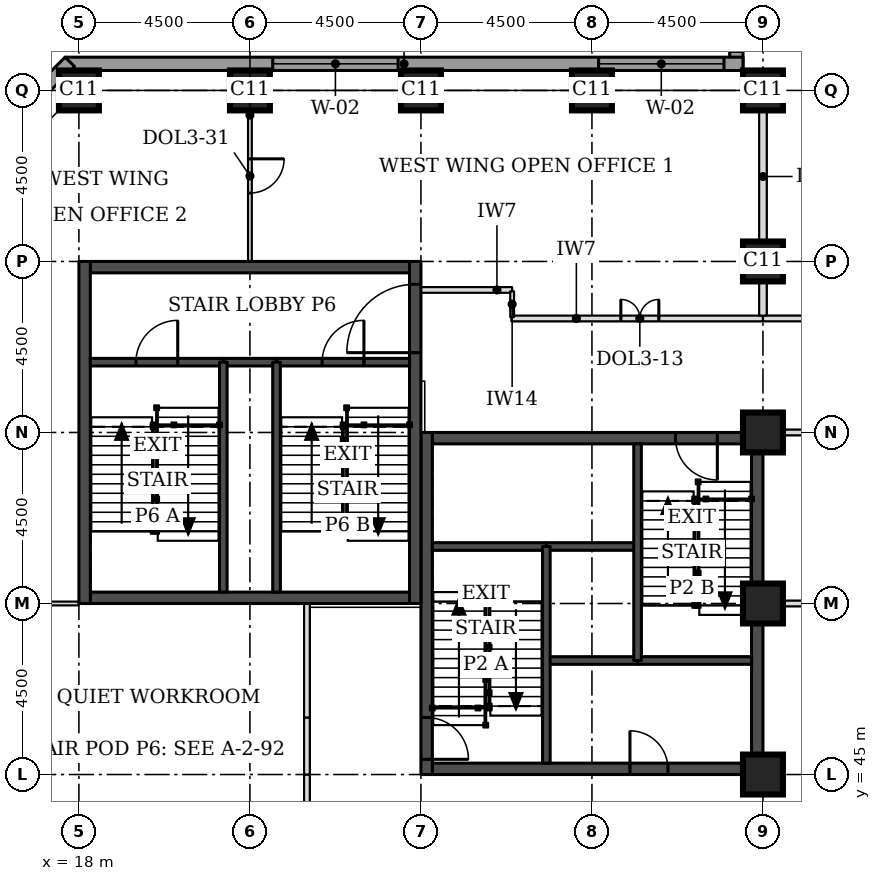
"""IFC4 building model, lengths in metres.
Left out: names, types, materials, properties, quantities, classifications, styles, units other than length and angle.
Written with IfcOpenShell. Run it as: python <this file> out.ifc"""

import sys

from ifc_helpers import new_model, si_unit, direction, frame, frame_2d, origin, origin_2d, place, context, subcontext, project, spatial, rectangle, extrude, element, fill, save


model = new_model("IFC4")
c1 = context("Model", 3, precision=1e-05, world=origin(), true_north=direction((0.0, 1.0)))
c2 = subcontext(c1, "Body", "Model", "MODEL_VIEW")
j1 = project(units=[si_unit("LENGTHUNIT", "METRE"), si_unit("PLANEANGLEUNIT", "RADIAN")], contexts=[c1])
p1 = place(None, origin())
s1 = spatial("IfcSite", under=j1, at=p1, CompositionType="ELEMENT")
p2 = place(p1, origin())
s2 = spatial("IfcBuilding", under=s1, at=p2, CompositionType="ELEMENT")
p3 = place(p2, frame((0.0, 0.0, 97.4)))
s3 = spatial("IfcBuildingStorey", under=s2, at=p3, CompositionType="ELEMENT", Elevation=97.4)
for number, where, z_axis, x_axis in (
    (1, (36.0, 45.0, 0.0), (0.0, 0.0, 1.0), (1.0, 0.0, 0.0)),
    (2, (36.0, 49.5, 0.0), (0.0, 0.0, 1.0), (1.0, 0.0, 0.0)),
    (3, (36.0, 54.0, 0.0), (0.0, 0.0, 1.0), (1.0, 0.0, 0.0)),
    (4, (36.0, 58.5, 0.0), (0.0, 0.0, 1.0), (1.0, 0.0, 0.0)),
    (5, (18.0, 63.0, 0.0), (0.0, 0.0, 1.0), (1.0, 0.0, 0.0)),
    (6, (22.5, 63.0, 0.0), (0.0, 0.0, 1.0), (1.0, 0.0, 0.0)),
    (7, (27.0, 63.0, 0.0), (0.0, 0.0, 1.0), (1.0, 0.0, 0.0)),
    (8, (31.5, 63.0, 0.0), (0.0, 0.0, 1.0), (1.0, 0.0, 0.0)),
    (9, (36.0, 63.0, 0.0), (0.0, 0.0, 1.0), (1.0, 0.0, 0.0)),
):
    element("IfcColumn", number, at=place(p3, frame(where, z_axis=z_axis, x_axis=x_axis)), inside=s3, PredefinedType="COLUMN", context=c2, shape_type="SweptSolid", body=[
        extrude(rectangle(XDim=1.05, YDim=1.05, at=origin_2d()), origin(), (0.0, 0.0, 1.0), 3.7),
    ])
p4 = place(p3, frame((27.3, 45.15, 0.0), z_axis=(0.0, 0.0, 1.0), x_axis=(1.0, 0.0, 0.0)))
e10 = element("IfcWall", 10, at=p4, inside=s3, PredefinedType="SHEAR", context=c2, shape_type="SweptSolid", body=[
    extrude(rectangle(XDim=8.4, YDim=0.3, at=frame_2d((4.2, 0.0))), origin(), (0.0, 0.0, 1.0), 3.7),
])
p5 = place(p4, frame((5.2, 0.0, 0.0)))
e11 = element("IfcOpeningElement", 11, at=p5, cuts=e10, PredefinedType="OPENING", context=c2, shape_type="SweptSolid", body=[
    extrude(rectangle(XDim=1.0, YDim=2.1, at=frame_2d((0.5, 1.05))), frame((0.0, 0.16, 0.0), z_axis=(0.0, -1.0, 0.0), x_axis=(1.0, 0.0, 0.0)), (0.0, 0.0, 1.0), 0.32),
])
p6 = place(p3, frame((27.3, 53.85, 0.0), z_axis=(0.0, 0.0, 1.0), x_axis=(1.0, 0.0, 0.0)))
e12 = element("IfcWall", 12, at=p6, inside=s3, PredefinedType="SHEAR", context=c2, shape_type="SweptSolid", body=[
    extrude(rectangle(XDim=8.4, YDim=0.3, at=frame_2d((4.2, 0.0))), origin(), (0.0, 0.0, 1.0), 3.7),
])
p7 = place(p6, frame((6.4, 0.0, 0.0)))
e13 = element("IfcOpeningElement", 13, at=p7, cuts=e12, PredefinedType="OPENING", context=c2, shape_type="SweptSolid", body=[
    extrude(rectangle(XDim=1.1, YDim=2.1, at=frame_2d((0.55, 1.05))), frame((0.0, 0.16, 0.0), z_axis=(0.0, -1.0, 0.0), x_axis=(1.0, 0.0, 0.0)), (0.0, 0.0, 1.0), 0.32),
])
p8 = place(p3, frame((27.15, 45.0, 0.0), z_axis=(0.0, 0.0, 1.0), x_axis=(0.0, 1.0, 0.0)))
e14 = element("IfcWall", 14, at=p8, inside=s3, PredefinedType="SHEAR", context=c2, shape_type="SweptSolid", body=[
    extrude(rectangle(XDim=9.0, YDim=0.3, at=frame_2d((4.5, 0.0))), origin(), (0.0, 0.0, 1.0), 3.7),
])
p9 = place(p8, frame((0.4, 0.0, 0.0)))
e15 = element("IfcOpeningElement", 15, at=p9, cuts=e14, PredefinedType="OPENING", context=c2, shape_type="SweptSolid", body=[
    extrude(rectangle(XDim=1.1, YDim=2.1, at=frame_2d((0.55, 1.05))), frame((0.0, 0.16, 0.0), z_axis=(0.0, -1.0, 0.0), x_axis=(1.0, 0.0, 0.0)), (0.0, 0.0, 1.0), 0.32),
])
p10 = place(p3, frame((35.85, 45.0, 0.0), z_axis=(0.0, 0.0, 1.0), x_axis=(0.0, 1.0, 0.0)))
e16 = element("IfcWall", 16, at=p10, inside=s3, PredefinedType="SHEAR", context=c2, shape_type="SweptSolid", body=[
    extrude(rectangle(XDim=9.0, YDim=0.3, at=frame_2d((4.5, 0.0))), origin(), (0.0, 0.0, 1.0), 3.7),
])
for number, where, z_axis, x_axis in (
    (17, (18.3, 49.65, 0.0), (0.0, 0.0, 1.0), (1.0, 0.0, 0.0)),
    (18, (18.3, 58.35, 0.0), (0.0, 0.0, 1.0), (1.0, 0.0, 0.0)),
):
    element("IfcWall", number, at=place(p3, frame(where, z_axis=z_axis, x_axis=x_axis)), inside=s3, PredefinedType="SHEAR", context=c2, shape_type="SweptSolid", body=[
        extrude(rectangle(XDim=8.4, YDim=0.3, at=frame_2d((4.2, 0.0))), origin(), (0.0, 0.0, 1.0), 3.7),
    ])
p11 = place(p3, frame((18.15, 49.5, 0.0), z_axis=(0.0, 0.0, 1.0), x_axis=(0.0, 1.0, 0.0)))
e19 = element("IfcWall", 19, at=p11, inside=s3, PredefinedType="SHEAR", context=c2, shape_type="SweptSolid", body=[
    extrude(rectangle(XDim=9.0, YDim=0.3, at=frame_2d((4.5, 0.0))), origin(), (0.0, 0.0, 1.0), 3.7),
])
p12 = place(p3, frame((26.85, 49.5, 0.0), z_axis=(0.0, 0.0, 1.0), x_axis=(0.0, 1.0, 0.0)))
e20 = element("IfcWall", 20, at=p12, inside=s3, PredefinedType="SHEAR", context=c2, shape_type="SweptSolid", body=[
    extrude(rectangle(XDim=9.0, YDim=0.3, at=frame_2d((4.5, 0.0))), origin(), (0.0, 0.0, 1.0), 3.7),
])
p13 = place(p12, frame((6.6, 0.0, 0.0)))
e21 = element("IfcOpeningElement", 21, at=p13, cuts=e20, PredefinedType="OPENING", context=c2, shape_type="SweptSolid", body=[
    extrude(rectangle(XDim=1.8, YDim=2.1, at=frame_2d((0.9, 1.05))), frame((0.0, 0.16, 0.0), z_axis=(0.0, -1.0, 0.0), x_axis=(1.0, 0.0, 0.0)), (0.0, 0.0, 1.0), 0.32),
])
p14 = place(p3, frame((35.3, 76.862, 0.0), z_axis=(0.0, 0.0, 1.0), x_axis=(0.0, -1.0, 0.0)))
e22 = element("IfcWall", 22, at=p14, inside=s3, PredefinedType="STANDARD", context=c2, shape_type="SweptSolid", body=[
    extrude(rectangle(XDim=13.337, YDim=0.35, at=frame_2d((6.669, 0.0))), origin(), (0.0, 0.0, 1.0), 3.525),
])
p15 = place(p14, frame((9.537, 0.0, 0.9)))
e23 = element("IfcOpeningElement", 23, at=p15, cuts=e22, PredefinedType="OPENING", context=c2, shape_type="SweptSolid", body=[
    extrude(rectangle(XDim=3.3, YDim=1.9, at=frame_2d((1.65, 0.95))), frame((0.0, 0.185, 0.0), z_axis=(0.0, -1.0, 0.0), x_axis=(1.0, 0.0, 0.0)), (0.0, 0.0, 1.0), 0.37),
])
p16 = place(p3, frame((35.475, 63.7, 0.0), z_axis=(0.0, 0.0, 1.0), x_axis=(-1.0, 0.0, 0.0)))
e24 = element("IfcWall", 24, at=p16, inside=s3, PredefinedType="STANDARD", context=c2, shape_type="SweptSolid", body=[
    extrude(rectangle(XDim=17.837, YDim=0.35, at=frame_2d((8.919, 0.0))), origin(), (0.0, 0.0, 1.0), 3.525),
])
p17 = place(p16, frame((0.5, 0.0, 0.9)))
e25 = element("IfcOpeningElement", 25, at=p17, cuts=e24, PredefinedType="OPENING", context=c2, shape_type="SweptSolid", body=[
    extrude(rectangle(XDim=3.3, YDim=1.9, at=frame_2d((1.65, 0.95))), frame((0.0, 0.185, 0.0), z_axis=(0.0, -1.0, 0.0), x_axis=(1.0, 0.0, 0.0)), (0.0, 0.0, 1.0), 0.37),
])
p18 = place(p16, frame((9.075, 0.0, 0.9)))
e26 = element("IfcOpeningElement", 26, at=p18, cuts=e24, PredefinedType="OPENING", context=c2, shape_type="SweptSolid", body=[
    extrude(rectangle(XDim=3.3, YDim=1.9, at=frame_2d((1.65, 0.95))), frame((0.0, 0.185, 0.0), z_axis=(0.0, -1.0, 0.0), x_axis=(1.0, 0.0, 0.0)), (0.0, 0.0, 1.0), 0.37),
])
p19 = place(p3, frame((17.761, 63.751, 0.0), z_axis=(0.0, 0.0, 1.0), x_axis=(-0.707106781187, -0.707106781187, 0.0)))
e27 = element("IfcWall", 27, at=p19, inside=s3, PredefinedType="STANDARD", context=c2, shape_type="SweptSolid", body=[
    extrude(rectangle(XDim=7.089, YDim=0.35, at=frame_2d((3.544, 0.0))), origin(), (0.0, 0.0, 1.0), 3.525),
])
p20 = place(p19, frame((1.894, 0.0, 0.9)))
e28 = element("IfcOpeningElement", 28, at=p20, cuts=e27, PredefinedType="OPENING", context=c2, shape_type="SweptSolid", body=[
    extrude(rectangle(XDim=3.3, YDim=1.9, at=frame_2d((1.65, 0.95))), frame((0.0, 0.185, 0.0), z_axis=(0.0, -1.0, 0.0), x_axis=(1.0, 0.0, 0.0)), (0.0, 0.0, 1.0), 0.37),
])
p21 = place(p3, frame((12.749, 44.761, 0.0), z_axis=(0.0, 0.0, 1.0), x_axis=(0.707106781187, -0.707106781187, 0.0)))
e29 = element("IfcWall", 29, at=p21, inside=s3, PredefinedType="STANDARD", context=c2, shape_type="SweptSolid", body=[
    extrude(rectangle(XDim=7.089, YDim=0.35, at=frame_2d((3.544, 0.0))), origin(), (0.0, 0.0, 1.0), 3.525),
])
p22 = place(p21, frame((1.894, 0.0, 0.9)))
e30 = element("IfcOpeningElement", 30, at=p22, cuts=e29, PredefinedType="OPENING", context=c2, shape_type="SweptSolid", body=[
    extrude(rectangle(XDim=3.3, YDim=1.9, at=frame_2d((1.65, 0.95))), frame((0.0, 0.185, 0.0), z_axis=(0.0, -1.0, 0.0), x_axis=(1.0, 0.0, 0.0)), (0.0, 0.0, 1.0), 0.37),
])
for number, where, z_axis, x_axis in (
    (31, (36.525, 49.5, 0.0), (0.0, 0.0, 1.0), (1.0, 0.0, 0.0)),
    (32, (36.525, 54.0, 0.0), (0.0, 0.0, 1.0), (1.0, 0.0, 0.0)),
):
    element("IfcWall", number, at=place(p3, frame(where, z_axis=z_axis, x_axis=x_axis)), inside=s3, PredefinedType="PARTITIONING", context=c2, shape_type="SweptSolid", body=[
        extrude(rectangle(XDim=5.55, YDim=0.15, at=frame_2d((2.775, 0.0))), origin(), (0.0, 0.0, 1.0), 3.55),
    ])
p23 = place(p3, frame((29.38, 57.0, 0.0), z_axis=(0.0, 0.0, 1.0), x_axis=(1.0, 0.0, 0.0)))
e33 = element("IfcWall", 33, at=p23, inside=s3, PredefinedType="PARTITIONING", context=c2, shape_type="SweptSolid", body=[
    extrude(rectangle(XDim=6.62, YDim=0.15, at=frame_2d((3.31, 0.0))), origin(), (0.0, 0.0, 1.0), 3.55),
])
p24 = place(p23, frame((2.88, 0.0, 0.0)))
e34 = element("IfcOpeningElement", 34, at=p24, cuts=e33, PredefinedType="OPENING", context=c2, shape_type="SweptSolid", body=[
    extrude(rectangle(XDim=1.0, YDim=2.1, at=frame_2d((0.5, 1.05))), frame((0.0, 0.085, 0.0), z_axis=(0.0, -1.0, 0.0), x_axis=(1.0, 0.0, 0.0)), (0.0, 0.0, 1.0), 0.17),
])
p25 = place(p3, frame((36.0, 57.0, 0.0), z_axis=(0.0, 0.0, 1.0), x_axis=(1.0, 0.0, 0.0)))
e35 = element("IfcWall", 35, at=p25, inside=s3, PredefinedType="PARTITIONING", context=c2, shape_type="SweptSolid", body=[
    extrude(rectangle(XDim=6.075, YDim=0.15, at=frame_2d((3.038, 0.0))), origin(), (0.0, 0.0, 1.0), 3.55),
])
p26 = place(p25, frame((2.55, 0.0, 0.0)))
e36 = element("IfcOpeningElement", 36, at=p26, cuts=e35, PredefinedType="OPENING", context=c2, shape_type="SweptSolid", body=[
    extrude(rectangle(XDim=1.0, YDim=2.1, at=frame_2d((0.5, 1.05))), frame((0.0, 0.085, 0.0), z_axis=(0.0, -1.0, 0.0), x_axis=(1.0, 0.0, 0.0)), (0.0, 0.0, 1.0), 0.17),
])
for number, where, z_axis, x_axis in (
    (37, (24.0, 43.5, 0.0), (0.0, 0.0, 1.0), (0.0, 1.0, 0.0)),
    (38, (24.0, 45.0, 0.0), (0.0, 0.0, 1.0), (0.0, 1.0, 0.0)),
):
    element("IfcWall", number, at=place(p3, frame(where, z_axis=z_axis, x_axis=x_axis)), inside=s3, PredefinedType="PARTITIONING", context=c2, shape_type="SweptSolid", body=[
        extrude(rectangle(XDim=1.5, YDim=0.15, at=frame_2d((0.75, 0.0))), origin(), (0.0, 0.0, 1.0), 3.55),
    ])
p27 = place(p3, frame((24.0, 46.5, 0.0), z_axis=(0.0, 0.0, 1.0), x_axis=(0.0, 1.0, 0.0)))
e39 = element("IfcWall", 39, at=p27, inside=s3, PredefinedType="PARTITIONING", context=c2, shape_type="SweptSolid", body=[
    extrude(rectangle(XDim=3.0, YDim=0.15, at=frame_2d((1.5, 0.0))), origin(), (0.0, 0.0, 1.0), 3.55),
])
p28 = place(p3, frame((36.0, 57.075, 0.0), z_axis=(0.0, 0.0, 1.0), x_axis=(0.0, 1.0, 0.0)))
e40 = element("IfcWall", 40, at=p28, inside=s3, PredefinedType="PARTITIONING", context=c2, shape_type="SweptSolid", body=[
    extrude(rectangle(XDim=0.9, YDim=0.2, at=frame_2d((0.45, 0.0))), origin(), (0.0, 0.0, 1.0), 2.8),
])
p29 = place(p3, frame((36.0, 58.995, 0.0), z_axis=(0.0, 0.0, 1.0), x_axis=(0.0, 1.0, 0.0)))
e41 = element("IfcWall", 41, at=p29, inside=s3, PredefinedType="PARTITIONING", context=c2, shape_type="SweptSolid", body=[
    extrude(rectangle(XDim=3.48, YDim=0.2, at=frame_2d((1.74, 0.0))), origin(), (0.0, 0.0, 1.0), 2.8),
])
p30 = place(p3, frame((22.5, 63.0, 0.0), z_axis=(0.0, 0.0, 1.0), x_axis=(0.0, -1.0, 0.0)))
e42 = element("IfcWall", 42, at=p30, inside=s3, PredefinedType="PARTITIONING", context=c2, shape_type="SweptSolid", body=[
    extrude(rectangle(XDim=4.5, YDim=0.1, at=frame_2d((2.25, 0.0))), origin(), (0.0, 0.0, 1.0), 3.55),
])
p31 = place(p30, frame((1.8, 0.0, 0.0)))
e43 = element("IfcOpeningElement", 43, at=p31, cuts=e42, PredefinedType="OPENING", context=c2, shape_type="SweptSolid", body=[
    extrude(rectangle(XDim=0.9, YDim=2.1, at=frame_2d((0.45, 1.05))), frame((0.0, 0.06, 0.0), z_axis=(0.0, -1.0, 0.0), x_axis=(1.0, 0.0, 0.0)), (0.0, 0.0, 1.0), 0.12),
])
p32 = place(p3, frame((13.5, 49.5, 0.0), z_axis=(0.0, 0.0, 1.0), x_axis=(1.0, 0.0, 0.0)))
e44 = element("IfcWall", 44, at=p32, inside=s3, PredefinedType="PARTITIONING", context=c2, shape_type="SweptSolid", body=[
    extrude(rectangle(XDim=4.5, YDim=0.1, at=frame_2d((2.25, 0.0))), origin(), (0.0, 0.0, 1.0), 3.55),
])
p33 = place(p32, frame((1.8, 0.0, 0.0)))
e45 = element("IfcOpeningElement", 45, at=p33, cuts=e44, PredefinedType="OPENING", context=c2, shape_type="SweptSolid", body=[
    extrude(rectangle(XDim=0.9, YDim=2.1, at=frame_2d((0.45, 1.05))), frame((0.0, 0.06, 0.0), z_axis=(0.0, -1.0, 0.0), x_axis=(1.0, 0.0, 0.0)), (0.0, 0.0, 1.0), 0.12),
])
p34 = place(p3, frame((27.0, 57.75, 0.0), z_axis=(0.0, 0.0, 1.0), x_axis=(1.0, 0.0, 0.0)))
e46 = element("IfcWall", 46, at=p34, inside=s3, PredefinedType="PARTITIONING", context=c2, shape_type="SweptSolid", body=[
    extrude(rectangle(XDim=2.4, YDim=0.15, at=frame_2d((1.2, 0.0))), origin(), (0.0, 0.0, 1.0), 3.55),
])
p35 = place(p3, frame((29.4, 57.715, 0.0), z_axis=(0.0, 0.0, 1.0), x_axis=(0.0, -1.0, 0.0)))
e47 = element("IfcWall", 47, at=p35, inside=s3, PredefinedType="PARTITIONING", context=c2, shape_type="SweptSolid", body=[
    extrude(rectangle(XDim=0.68, YDim=0.1, at=frame_2d((0.34, 0.0))), origin(), (0.0, 0.0, 1.0), 3.55),
])
p36 = place(p3, frame((30.3, 48.0, 0.0), z_axis=(0.0, 0.0, 1.0), x_axis=(1.0, 0.0, 0.0)))
e48 = element("IfcWall", 48, at=p36, inside=s3, PredefinedType="SOLIDWALL", context=c2, shape_type="SweptSolid", body=[
    extrude(rectangle(XDim=2.4, YDim=0.2, at=frame_2d((1.2, 0.0))), origin(), (0.0, 0.0, 1.0), 3.55),
])
p37 = place(p3, frame((32.7, 48.0, 0.0), z_axis=(0.0, 0.0, 1.0), x_axis=(1.0, 0.0, 0.0)))
e49 = element("IfcWall", 49, at=p37, inside=s3, PredefinedType="SOLIDWALL", context=c2, shape_type="SweptSolid", body=[
    extrude(rectangle(XDim=3.0, YDim=0.2, at=frame_2d((1.5, 0.0))), origin(), (0.0, 0.0, 1.0), 3.55),
])
p38 = place(p3, frame((30.3, 51.0, 0.0), z_axis=(0.0, 0.0, 1.0), x_axis=(1.0, 0.0, 0.0)))
e50 = element("IfcWall", 50, at=p38, inside=s3, PredefinedType="SOLIDWALL", context=c2, shape_type="SweptSolid", body=[
    extrude(rectangle(XDim=2.4, YDim=0.2, at=frame_2d((1.2, 0.0))), origin(), (0.0, 0.0, 1.0), 3.7),
])
p39 = place(p3, frame((27.3, 51.0, 0.0), z_axis=(0.0, 0.0, 1.0), x_axis=(1.0, 0.0, 0.0)))
e51 = element("IfcWall", 51, at=p39, inside=s3, PredefinedType="SOLIDWALL", context=c2, shape_type="SweptSolid", body=[
    extrude(rectangle(XDim=3.0, YDim=0.2, at=frame_2d((1.5, 0.0))), origin(), (0.0, 0.0, 1.0), 3.55),
])
for number, where, z_axis, x_axis in (
    (52, (30.3, 45.3, 0.0), (0.0, 0.0, 1.0), (0.0, 1.0, 0.0)),
    (53, (32.7, 48.0, 0.0), (0.0, 0.0, 1.0), (0.0, 1.0, 0.0)),
):
    element("IfcWall", number, at=place(p3, frame(where, z_axis=z_axis, x_axis=x_axis)), inside=s3, PredefinedType="SOLIDWALL", context=c2, shape_type="SweptSolid", body=[
        extrude(rectangle(XDim=5.7, YDim=0.2, at=frame_2d((2.85, 0.0))), origin(), (0.0, 0.0, 1.0), 3.55),
    ])
p40 = place(p3, frame((21.8, 55.85, 0.0), z_axis=(0.0, 0.0, 1.0), x_axis=(1.0, 0.0, 0.0)))
e54 = element("IfcWall", 54, at=p40, inside=s3, PredefinedType="SOLIDWALL", context=c2, shape_type="SweptSolid", body=[
    extrude(rectangle(XDim=1.4, YDim=0.2, at=frame_2d((0.7, 0.0))), origin(), (0.0, 0.0, 1.0), 3.55),
])
p41 = place(p3, frame((18.3, 55.85, 0.0), z_axis=(0.0, 0.0, 1.0), x_axis=(1.0, 0.0, 0.0)))
e55 = element("IfcWall", 55, at=p41, inside=s3, PredefinedType="SOLIDWALL", context=c2, shape_type="SweptSolid", body=[
    extrude(rectangle(XDim=3.5, YDim=0.2, at=frame_2d((1.75, 0.0))), origin(), (0.0, 0.0, 1.0), 3.55),
])
p42 = place(p41, frame((1.2, 0.0, 0.0)))
e56 = element("IfcOpeningElement", 56, at=p42, cuts=e55, PredefinedType="OPENING", context=c2, shape_type="SweptSolid", body=[
    extrude(rectangle(XDim=1.1, YDim=2.1, at=frame_2d((0.55, 1.05))), frame((0.0, 0.11, 0.0), z_axis=(0.0, -1.0, 0.0), x_axis=(1.0, 0.0, 0.0)), (0.0, 0.0, 1.0), 0.22),
])
p43 = place(p3, frame((23.2, 55.85, 0.0), z_axis=(0.0, 0.0, 1.0), x_axis=(1.0, 0.0, 0.0)))
e57 = element("IfcWall", 57, at=p43, inside=s3, PredefinedType="SOLIDWALL", context=c2, shape_type="SweptSolid", body=[
    extrude(rectangle(XDim=3.5, YDim=0.2, at=frame_2d((1.75, 0.0))), origin(), (0.0, 0.0, 1.0), 3.55),
])
p44 = place(p43, frame((1.2, 0.0, 0.0)))
e58 = element("IfcOpeningElement", 58, at=p44, cuts=e57, PredefinedType="OPENING", context=c2, shape_type="SweptSolid", body=[
    extrude(rectangle(XDim=1.1, YDim=2.1, at=frame_2d((0.55, 1.05))), frame((0.0, 0.11, 0.0), z_axis=(0.0, -1.0, 0.0), x_axis=(1.0, 0.0, 0.0)), (0.0, 0.0, 1.0), 0.22),
])
for number, where, z_axis, x_axis in (
    (59, (21.8, 49.8, 0.0), (0.0, 0.0, 1.0), (0.0, 1.0, 0.0)),
    (60, (23.2, 49.8, 0.0), (0.0, 0.0, 1.0), (0.0, 1.0, 0.0)),
):
    element("IfcWall", number, at=place(p3, frame(where, z_axis=z_axis, x_axis=x_axis)), inside=s3, PredefinedType="SOLIDWALL", context=c2, shape_type="SweptSolid", body=[
        extrude(rectangle(XDim=6.05, YDim=0.2, at=frame_2d((3.025, 0.0))), origin(), (0.0, 0.0, 1.0), 3.55),
    ])
p45 = place(p17, origin())
e61 = element("IfcWindow", 61, at=p45, inside=s3, PartitioningType="SINGLE_PANEL", PredefinedType="WINDOW", context=c2, shape_type="SweptSolid", body=[
    extrude(rectangle(XDim=3.3, YDim=1.9, at=frame_2d((1.65, 0.95))), frame((0.0, 0.085, 0.0), z_axis=(0.0, -1.0, 0.0), x_axis=(1.0, 0.0, 0.0)), (0.0, 0.0, 1.0), 0.06),
])
fill(e25, e61)
p46 = place(p18, origin())
e62 = element("IfcWindow", 62, at=p46, inside=s3, PartitioningType="SINGLE_PANEL", PredefinedType="WINDOW", context=c2, shape_type="SweptSolid", body=[
    extrude(rectangle(XDim=3.3, YDim=1.9, at=frame_2d((1.65, 0.95))), frame((0.0, 0.085, 0.0), z_axis=(0.0, -1.0, 0.0), x_axis=(1.0, 0.0, 0.0)), (0.0, 0.0, 1.0), 0.06),
])
fill(e26, e62)
p47 = place(p24, origin())
e63 = element("IfcDoor", 63, at=p47, inside=s3, OperationType="DOUBLE_DOOR_SINGLE_SWING", PredefinedType="DOOR", context=c2, shape_type="SweptSolid", body=[
    extrude(rectangle(XDim=1.0, YDim=2.1, at=frame_2d((0.5, 1.05))), frame((0.0, 0.025, 0.0), z_axis=(0.0, -1.0, 0.0), x_axis=(1.0, 0.0, 0.0)), (0.0, 0.0, 1.0), 0.05),
])
fill(e34, e63)
p48 = place(p31, origin())
e64 = element("IfcDoor", 64, at=p48, inside=s3, OperationType="SINGLE_SWING_LEFT", PredefinedType="DOOR", context=c2, shape_type="SweptSolid", body=[
    extrude(rectangle(XDim=0.9, YDim=2.1, at=frame_2d((0.45, 1.05))), frame((0.0, 0.025, 0.0), z_axis=(0.0, -1.0, 0.0), x_axis=(1.0, 0.0, 0.0)), (0.0, 0.0, 1.0), 0.05),
])
fill(e43, e64)
p49 = place(p9, frame((1.1, 0.0, 0.0), z_axis=(0.0, 0.0, 1.0), x_axis=(-1.0, 0.0, 0.0)))
e65 = element("IfcDoor", 65, at=p49, inside=s3, OperationType="SINGLE_SWING_RIGHT", PredefinedType="DOOR", context=c2, shape_type="SweptSolid", body=[
    extrude(rectangle(XDim=1.1, YDim=2.1, at=frame_2d((0.55, 1.05))), frame((0.0, 0.025, 0.0), z_axis=(0.0, -1.0, 0.0), x_axis=(1.0, 0.0, 0.0)), (0.0, 0.0, 1.0), 0.05),
])
fill(e15, e65)
p50 = place(p7, frame((1.1, 0.0, 0.0), z_axis=(0.0, 0.0, 1.0), x_axis=(-1.0, 0.0, 0.0)))
e66 = element("IfcDoor", 66, at=p50, inside=s3, OperationType="SINGLE_SWING_LEFT", PredefinedType="DOOR", context=c2, shape_type="SweptSolid", body=[
    extrude(rectangle(XDim=1.1, YDim=2.1, at=frame_2d((0.55, 1.05))), frame((0.0, 0.025, 0.0), z_axis=(0.0, -1.0, 0.0), x_axis=(1.0, 0.0, 0.0)), (0.0, 0.0, 1.0), 0.05),
])
fill(e13, e66)
p51 = place(p5, origin())
e67 = element("IfcDoor", 67, at=p51, inside=s3, OperationType="SINGLE_SWING_LEFT", PredefinedType="DOOR", context=c2, shape_type="SweptSolid", body=[
    extrude(rectangle(XDim=1.0, YDim=2.1, at=frame_2d((0.5, 1.05))), frame((0.0, 0.025, 0.0), z_axis=(0.0, -1.0, 0.0), x_axis=(1.0, 0.0, 0.0)), (0.0, 0.0, 1.0), 0.05),
])
fill(e11, e67)
p52 = place(p42, origin())
e68 = element("IfcDoor", 68, at=p52, inside=s3, OperationType="SINGLE_SWING_RIGHT", PredefinedType="DOOR", context=c2, shape_type="SweptSolid", body=[
    extrude(rectangle(XDim=1.1, YDim=2.1, at=frame_2d((0.55, 1.05))), frame((0.0, 0.025, 0.0), z_axis=(0.0, -1.0, 0.0), x_axis=(1.0, 0.0, 0.0)), (0.0, 0.0, 1.0), 0.05),
])
fill(e56, e68)
p53 = place(p44, origin())
e69 = element("IfcDoor", 69, at=p53, inside=s3, OperationType="SINGLE_SWING_RIGHT", PredefinedType="DOOR", context=c2, shape_type="SweptSolid", body=[
    extrude(rectangle(XDim=1.1, YDim=2.1, at=frame_2d((0.55, 1.05))), frame((0.0, 0.025, 0.0), z_axis=(0.0, -1.0, 0.0), x_axis=(1.0, 0.0, 0.0)), (0.0, 0.0, 1.0), 0.05),
])
fill(e58, e69)
p54 = place(p13, origin())
e70 = element("IfcDoor", 70, at=p54, inside=s3, OperationType="SINGLE_SWING_LEFT", PredefinedType="DOOR", context=c2, shape_type="SweptSolid", body=[
    extrude(rectangle(XDim=1.8, YDim=2.1, at=frame_2d((0.9, 1.05))), frame((0.0, 0.025, 0.0), z_axis=(0.0, -1.0, 0.0), x_axis=(1.0, 0.0, 0.0)), (0.0, 0.0, 1.0), 0.05),
])
fill(e21, e70)
save(model, sys.argv[1])
